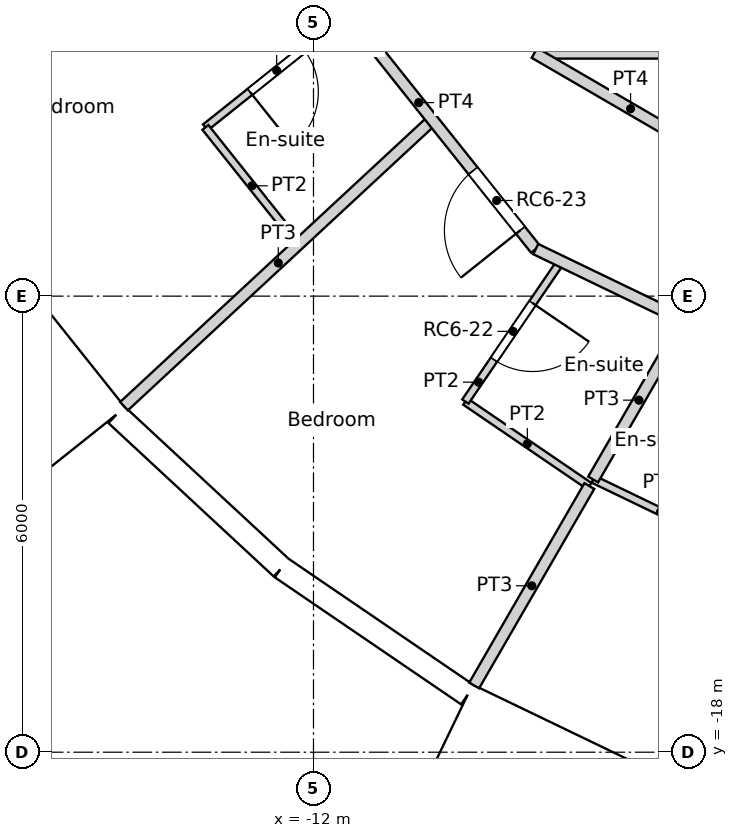
"""IFC4 building model, lengths in metres.
Left out: names, types, materials, properties, quantities, classifications, styles, units other than length and angle.
Written with IfcOpenShell. Run it as: python <this file> out.ifc"""

import sys

from ifc_helpers import new_model, si_unit, direction, frame, frame_2d, origin, origin_2d, place, context, subcontext, project, spatial, rectangle, circle, extrude, element, fill, save


model = new_model("IFC4")
c1 = context("Model", 3, precision=1e-05, world=origin(), true_north=direction((0.0, 1.0)))
c2 = subcontext(c1, "Body", "Model", "MODEL_VIEW")
j1 = project(units=[si_unit("LENGTHUNIT", "METRE"), si_unit("PLANEANGLEUNIT", "RADIAN")], contexts=[c1])
p1 = place(None, origin())
s1 = spatial("IfcSite", under=j1, at=p1, CompositionType="ELEMENT")
p2 = place(p1, origin())
s2 = spatial("IfcBuilding", under=s1, at=p2, CompositionType="ELEMENT")
p3 = place(p2, frame((0.0, 0.0, 283.8)))
s3 = spatial("IfcBuildingStorey", under=s2, at=p3, CompositionType="ELEMENT", Elevation=283.8)
for number, where, z_axis, x_axis in (
    (1, (-13.798, -12.802, 0.0), (0.0, 0.0, 1.0), (1.0, 0.0, 0.0)),
    (2, (-9.411, -16.301, 0.0), (0.0, 0.0, 1.0), (1.0, 0.0, 0.0)),
):
    element("IfcColumn", number, at=place(p3, frame(where, z_axis=z_axis, x_axis=x_axis)), inside=s3, PredefinedType="COLUMN", context=c2, shape_type="SweptSolid", body=[
        extrude(circle(Radius=0.45, at=origin_2d()), origin(), (0.0, 0.0, 1.0), 3.6),
    ])
p4 = place(p3, frame((-16.917, -11.572, -0.35), z_axis=(0.0, 0.0, 1.0), x_axis=(0.623523286312, -0.781804778335, 0.0)))
e3 = element("IfcWall", 3, at=p4, inside=s3, PredefinedType="ELEMENTEDWALL", context=c2, shape_type="SweptSolid", body=[
    extrude(rectangle(XDim=3.0, YDim=1.45, at=frame_2d((1.5, 0.0))), origin(), (0.0, 0.0, 1.0), 3.6),
])
p5 = place(p4, frame((1.5, 0.0, 1.9)))
e4 = element("IfcOpeningElement", 4, at=p5, cuts=e3, PredefinedType="OPENING", context=c2, shape_type="SweptSolid", body=[
    extrude(circle(Radius=0.9, at=origin_2d()), frame((0.0, 0.735, 0.0), z_axis=(0.0, -1.0, 0.0), x_axis=(1.0, 0.0, 0.0)), (0.0, 0.0, 1.0), 1.47),
])
p6 = place(p3, frame((-14.593, -13.561, 0.0), z_axis=(0.0, 0.0, 1.0), x_axis=(0.733028283666, -0.680198158882, 0.0)))
e5 = element("IfcWall", 5, at=p6, inside=s3, PredefinedType="SOLIDWALL", context=c2, shape_type="SweptSolid", body=[
    extrude(rectangle(XDim=2.962, YDim=0.3, at=frame_2d((1.481, 0.0))), origin(), (0.0, 0.0, 1.0), 3.25),
])
p7 = place(p6, frame((1.481, 0.0, 1.55)))
e6 = element("IfcOpeningElement", 6, at=p7, cuts=e5, PredefinedType="OPENING", context=c2, shape_type="SweptSolid", body=[
    extrude(circle(Radius=0.9, at=origin_2d()), frame((0.0, 0.16, 0.0), z_axis=(0.0, -1.0, 0.0), x_axis=(1.0, 0.0, 0.0)), (0.0, 0.0, 1.0), 0.32),
])
p8 = place(p3, frame((-12.421, -15.575, 0.0), z_axis=(0.0, 0.0, 1.0), x_axis=(0.826236061068, -0.563324037646, 0.0)))
e7 = element("IfcWall", 7, at=p8, inside=s3, PredefinedType="SOLIDWALL", context=c2, shape_type="SweptSolid", body=[
    extrude(rectangle(XDim=2.962, YDim=0.3, at=frame_2d((1.481, 0.0))), origin(), (0.0, 0.0, 1.0), 3.25),
])
p9 = place(p8, frame((1.481, 0.0, 1.55)))
e8 = element("IfcOpeningElement", 8, at=p9, cuts=e7, PredefinedType="OPENING", context=c2, shape_type="SweptSolid", body=[
    extrude(circle(Radius=0.9, at=origin_2d()), frame((0.0, 0.16, 0.0), z_axis=(0.0, -1.0, 0.0), x_axis=(1.0, 0.0, 0.0)), (0.0, 0.0, 1.0), 0.32),
])
p10 = place(p3, frame((-10.22, -17.766, -0.35), z_axis=(0.0, 0.0, 1.0), x_axis=(0.900953362039, -0.433915935904, 0.0)))
e9 = element("IfcWall", 9, at=p10, inside=s3, PredefinedType="ELEMENTEDWALL", context=c2, shape_type="SweptSolid", body=[
    extrude(rectangle(XDim=3.0, YDim=1.45, at=frame_2d((1.5, 0.0))), origin(), (0.0, 0.0, 1.0), 3.6),
])
p11 = place(p10, frame((1.5, 0.0, 1.9)))
e10 = element("IfcOpeningElement", 10, at=p11, cuts=e9, PredefinedType="OPENING", context=c2, shape_type="SweptSolid", body=[
    extrude(circle(Radius=0.9, at=origin_2d()), frame((0.0, 0.735, 0.0), z_axis=(0.0, -1.0, 0.0), x_axis=(1.0, 0.0, 0.0)), (0.0, 0.0, 1.0), 1.47),
])
p12 = place(p3, frame((-9.092, -8.8, 0.0), z_axis=(0.0, 0.0, 1.0), x_axis=(1.0, 0.0, 0.0)))
e11 = element("IfcWall", 11, at=p12, inside=s3, PredefinedType="PARTITIONING", context=c2, shape_type="SweptSolid", body=[
    extrude(rectangle(XDim=6.376, YDim=0.15, at=frame_2d((3.188, 0.0))), origin(), (0.0, 0.0, 1.0), 3.25),
])
p13 = place(p3, frame((-9.092, -8.8, 0.0), z_axis=(0.0, 0.0, 1.0), x_axis=(0.864470922103, -0.502682827277, 0.0)))
e12 = element("IfcWall", 12, at=p13, inside=s3, PredefinedType="PARTITIONING", context=c2, shape_type="SweptSolid", body=[
    extrude(rectangle(XDim=6.735, YDim=0.15, at=frame_2d((3.368, 0.0))), origin(), (0.0, 0.0, 1.0), 3.25),
])
p14 = place(p13, frame((2.974, 0.0, 0.0)))
e13 = element("IfcOpeningElement", 13, at=p14, cuts=e12, PredefinedType="OPENING", context=c2, shape_type="SweptSolid", body=[
    extrude(rectangle(XDim=1.0, YDim=2.04, at=frame_2d((0.5, 1.02))), frame((0.0, 0.075, 0.0), z_axis=(0.0, -1.0, 0.0), x_axis=(1.0, 0.0, 0.0)), (0.0, 0.0, 1.0), 0.15),
])
p15 = place(p3, frame((-11.3, -8.596, 0.0), z_axis=(0.0, 0.0, 1.0), x_axis=(0.623390921228, -0.781910326911, 0.0)))
e14 = element("IfcWall", 14, at=p15, inside=s3, PredefinedType="PARTITIONING", context=c2, shape_type="SweptSolid", body=[
    extrude(rectangle(XDim=3.564, YDim=0.15, at=frame_2d((1.782, 0.0))), origin(), (0.0, 0.0, 1.0), 3.25),
])
p16 = place(p15, frame((2.244, 0.0, 0.0)))
e15 = element("IfcOpeningElement", 15, at=p16, cuts=e14, PredefinedType="OPENING", context=c2, shape_type="SweptSolid", body=[
    extrude(rectangle(XDim=1.0, YDim=2.1, at=frame_2d((0.5, 1.05))), frame((0.0, 0.075, 0.0), z_axis=(0.0, -1.0, 0.0), x_axis=(1.0, 0.0, 0.0)), (0.0, 0.0, 1.0), 0.15),
])
p17 = place(p3, frame((-9.076, -11.381, 0.0), z_axis=(0.0, 0.0, 1.0), x_axis=(0.900778421649, -0.434278983018, 0.0)))
e16 = element("IfcWall", 16, at=p17, inside=s3, PredefinedType="PARTITIONING", context=c2, shape_type="SweptSolid", body=[
    extrude(rectangle(XDim=6.479, YDim=0.15, at=frame_2d((3.239, 0.0))), origin(), (0.0, 0.0, 1.0), 3.25),
])
p18 = place(p17, frame((4.719, 0.0, 0.0)))
e17 = element("IfcOpeningElement", 17, at=p18, cuts=e16, PredefinedType="OPENING", context=c2, shape_type="SweptSolid", body=[
    extrude(rectangle(XDim=1.0, YDim=2.1, at=frame_2d((0.5, 1.05))), frame((0.0, 0.075, 0.0), z_axis=(0.0, -1.0, 0.0), x_axis=(1.0, 0.0, 0.0)), (0.0, 0.0, 1.0), 0.15),
])
p19 = place(p3, frame((-13.422, -9.78, 0.0), z_axis=(0.0, 0.0, 1.0), x_axis=(0.781860394524, 0.623453545562, 0.0)))
e18 = element("IfcWall", 18, at=p19, inside=s3, PredefinedType="PARTITIONING", context=c2, shape_type="SweptSolid", body=[
    extrude(rectangle(XDim=2.4, YDim=0.1, at=frame_2d((1.2, 0.0))), origin(), (0.0, 0.0, 1.0), 3.25),
])
p20 = place(p19, frame((0.75, 0.0, 0.0)))
e19 = element("IfcOpeningElement", 19, at=p20, cuts=e18, PredefinedType="OPENING", context=c2, shape_type="SweptSolid", body=[
    extrude(rectangle(XDim=0.9, YDim=2.04, at=frame_2d((0.45, 1.02))), frame((0.0, 0.05, 0.0), z_axis=(0.0, -1.0, 0.0), x_axis=(1.0, 0.0, 0.0)), (0.0, 0.0, 1.0), 0.1),
])
p21 = place(p3, frame((-13.422, -9.78, 0.0), z_axis=(0.0, 0.0, 1.0), x_axis=(0.623330716607, -0.781958322249, 0.0)))
e20 = element("IfcWall", 20, at=p21, inside=s3, PredefinedType="PARTITIONING", context=c2, shape_type="SweptSolid", body=[
    extrude(rectangle(XDim=1.965, YDim=0.1, at=frame_2d((0.983, 0.0))), origin(), (0.0, 0.0, 1.0), 3.25),
])
p22 = place(p3, frame((-14.493, -13.448, 0.0), z_axis=(0.0, 0.0, 1.0), x_axis=(0.73295202722, 0.68028032883, 0.0)))
e21 = element("IfcWall", 21, at=p22, inside=s3, PredefinedType="PARTITIONING", context=c2, shape_type="SweptSolid", body=[
    extrude(rectangle(XDim=5.539, YDim=0.15, at=frame_2d((2.77, 0.0))), origin(), (0.0, 0.0, 1.0), 3.25),
])
p23 = place(p3, frame((-10.002, -13.387, 0.0), z_axis=(0.0, 0.0, 1.0), x_axis=(0.563469042551, 0.826137178734, 0.0)))
e22 = element("IfcWall", 22, at=p23, inside=s3, PredefinedType="PARTITIONING", context=c2, shape_type="SweptSolid", body=[
    extrude(rectangle(XDim=2.234, YDim=0.1, at=frame_2d((1.117, 0.0))), origin(), (0.0, 0.0, 1.0), 3.25),
])
p24 = place(p23, frame((0.667, 0.0, 0.0)))
e23 = element("IfcOpeningElement", 23, at=p24, cuts=e22, PredefinedType="OPENING", context=c2, shape_type="SweptSolid", body=[
    extrude(rectangle(XDim=0.9, YDim=2.04, at=frame_2d((0.45, 1.02))), frame((0.0, 0.05, 0.0), z_axis=(0.0, -1.0, 0.0), x_axis=(1.0, 0.0, 0.0)), (0.0, 0.0, 1.0), 0.1),
])
p25 = place(p3, frame((-10.002, -13.387, 0.0), z_axis=(0.0, 0.0, 1.0), x_axis=(0.82620117489, -0.563375202339, 0.0)))
e24 = element("IfcWall", 24, at=p25, inside=s3, PredefinedType="PARTITIONING", context=c2, shape_type="SweptSolid", body=[
    extrude(rectangle(XDim=1.974, YDim=0.1, at=frame_2d((0.987, 0.0))), origin(), (0.0, 0.0, 1.0), 3.25),
])
p26 = place(p3, frame((-9.886, -17.122, 0.0), z_axis=(0.0, 0.0, 1.0), x_axis=(0.500117793536, 0.865957384972, 0.0)))
e25 = element("IfcWall", 25, at=p26, inside=s3, PredefinedType="PARTITIONING", context=c2, shape_type="SweptSolid", body=[
    extrude(rectangle(XDim=3.029, YDim=0.15, at=frame_2d((1.515, 0.0))), origin(), (0.0, 0.0, 1.0), 3.25),
])
p27 = place(p3, frame((-8.321, -14.412, 0.0), z_axis=(0.0, 0.0, 1.0), x_axis=(0.500017667814, 0.866015203027, 0.0)))
e26 = element("IfcWall", 26, at=p27, inside=s3, PredefinedType="PARTITIONING", context=c2, shape_type="SweptSolid", body=[
    extrude(rectangle(XDim=2.41, YDim=0.15, at=frame_2d((1.205, 0.0))), origin(), (0.0, 0.0, 1.0), 3.25),
])
p28 = place(p3, frame((-8.319, -14.409, 0.0), z_axis=(0.0, 0.0, 1.0), x_axis=(0.900936932599, -0.433950047216, 0.0)))
e27 = element("IfcWall", 27, at=p28, inside=s3, PredefinedType="PARTITIONING", context=c2, shape_type="SweptSolid", body=[
    extrude(rectangle(XDim=1.966, YDim=0.1, at=frame_2d((0.983, 0.0))), origin(), (0.0, 0.0, 1.0), 3.25),
])
p29 = place(p5, origin())
e28 = element("IfcWindow", 28, at=p29, inside=s3, PartitioningType="SINGLE_PANEL", PredefinedType="WINDOW", context=c2, shape_type="SweptSolid", body=[
    extrude(circle(Radius=0.9, at=origin_2d()), frame((0.0, 0.695, 0.0), z_axis=(0.0, -1.0, 0.0), x_axis=(1.0, 0.0, 0.0)), (0.0, 0.0, 1.0), 0.1),
])
fill(e4, e28)
p30 = place(p7, origin())
e29 = element("IfcWindow", 29, at=p30, inside=s3, PartitioningType="SINGLE_PANEL", PredefinedType="WINDOW", context=c2, shape_type="SweptSolid", body=[
    extrude(circle(Radius=0.9, at=origin_2d()), frame((0.0, 0.12, 0.0), z_axis=(0.0, -1.0, 0.0), x_axis=(1.0, 0.0, 0.0)), (0.0, 0.0, 1.0), 0.1),
])
fill(e6, e29)
p31 = place(p9, origin())
e30 = element("IfcWindow", 30, at=p31, inside=s3, PartitioningType="SINGLE_PANEL", PredefinedType="WINDOW", context=c2, shape_type="SweptSolid", body=[
    extrude(circle(Radius=0.9, at=origin_2d()), frame((0.0, 0.12, 0.0), z_axis=(0.0, -1.0, 0.0), x_axis=(1.0, 0.0, 0.0)), (0.0, 0.0, 1.0), 0.1),
])
fill(e8, e30)
p32 = place(p11, origin())
e31 = element("IfcWindow", 31, at=p32, inside=s3, PartitioningType="SINGLE_PANEL", PredefinedType="WINDOW", context=c2, shape_type="SweptSolid", body=[
    extrude(circle(Radius=0.9, at=origin_2d()), frame((0.0, 0.695, 0.0), z_axis=(0.0, -1.0, 0.0), x_axis=(1.0, 0.0, 0.0)), (0.0, 0.0, 1.0), 0.1),
])
fill(e10, e31)
p33 = place(p20, origin())
e32 = element("IfcDoor", 32, at=p33, inside=s3, OperationType="SINGLE_SWING_RIGHT", PredefinedType="DOOR", context=c2, shape_type="SweptSolid", body=[
    extrude(rectangle(XDim=0.9, YDim=2.04, at=frame_2d((0.45, 1.02))), frame((0.0, 0.025, 0.0), z_axis=(0.0, -1.0, 0.0), x_axis=(1.0, 0.0, 0.0)), (0.0, 0.0, 1.0), 0.05),
])
fill(e19, e32)
p34 = place(p24, origin())
e33 = element("IfcDoor", 33, at=p34, inside=s3, OperationType="SINGLE_SWING_LEFT", PredefinedType="DOOR", context=c2, shape_type="SweptSolid", body=[
    extrude(rectangle(XDim=0.9, YDim=2.04, at=frame_2d((0.45, 1.02))), frame((0.0, 0.025, 0.0), z_axis=(0.0, -1.0, 0.0), x_axis=(1.0, 0.0, 0.0)), (0.0, 0.0, 1.0), 0.05),
])
fill(e23, e33)
p35 = place(p16, origin())
e34 = element("IfcDoor", 34, at=p35, inside=s3, OperationType="SINGLE_SWING_LEFT", PredefinedType="DOOR", context=c2, shape_type="SweptSolid", body=[
    extrude(rectangle(XDim=1.0, YDim=2.1, at=frame_2d((0.5, 1.05))), frame((0.0, 0.025, 0.0), z_axis=(0.0, -1.0, 0.0), x_axis=(1.0, 0.0, 0.0)), (0.0, 0.0, 1.0), 0.05),
])
fill(e15, e34)
save(model, sys.argv[1])
